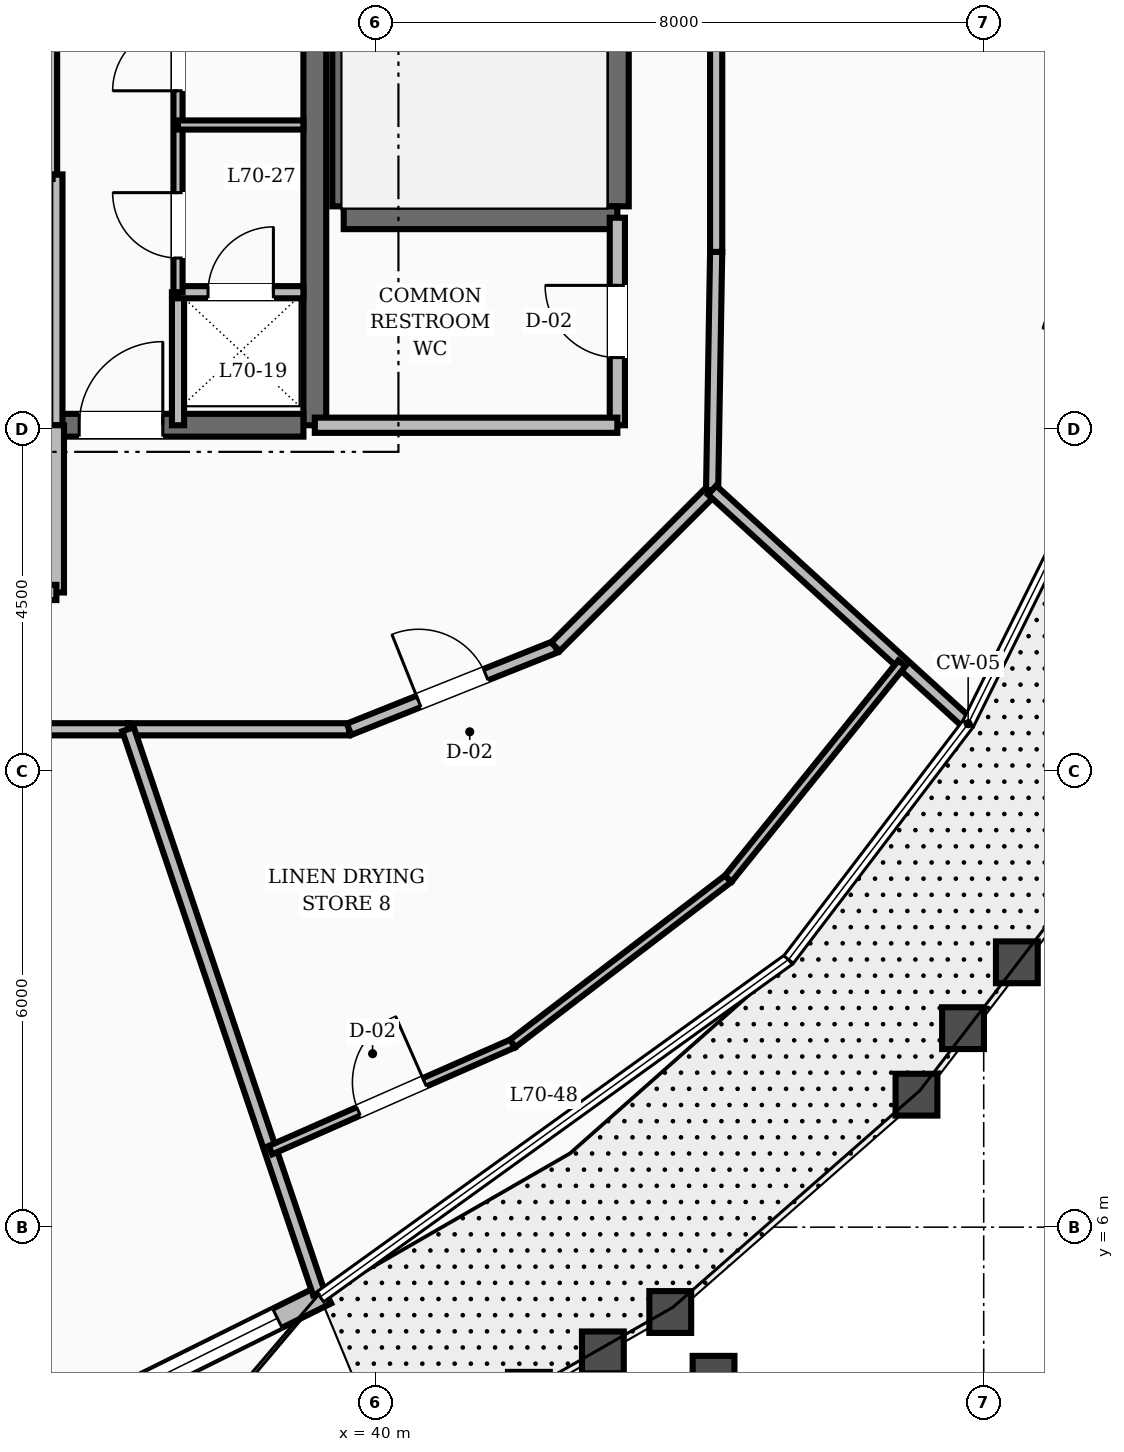
"""IFC4 building model, lengths in metres.
Left out: names, types, materials, properties, quantities, classifications, styles, units other than length and angle.
Written with IfcOpenShell. Run it as: python <this file> out.ifc"""

import sys

from ifc_helpers import new_model, si_unit, direction, frame, frame_2d, origin, place, context, subcontext, project, spatial, rectangle, extrude, element, fill, save


model = new_model("IFC4")
c1 = context("Model", 3, precision=1e-05, world=origin(), true_north=direction((0.0, 1.0)))
c2 = subcontext(c1, "Body", "Model", "MODEL_VIEW")
j1 = project(units=[si_unit("LENGTHUNIT", "METRE"), si_unit("PLANEANGLEUNIT", "RADIAN")], contexts=[c1])
p1 = place(None, origin())
s1 = spatial("IfcSite", under=j1, at=p1, CompositionType="ELEMENT")
p2 = place(p1, origin())
s2 = spatial("IfcBuilding", under=s1, at=p2, CompositionType="ELEMENT")
p3 = place(p2, frame((0.0, 0.0, 268.8)))
s3 = spatial("IfcBuildingStorey", under=s2, at=p3, CompositionType="ELEMENT", Elevation=268.8)
p4 = place(p3, frame((39.2, 16.55, 0.0), z_axis=(0.0, 0.0, 1.0), x_axis=(0.0, 1.0, 0.0)))
e1 = element("IfcWall", 1, at=p4, inside=s3, PredefinedType="SHEAR", context=c2, shape_type="SweptSolid", body=[
    extrude(rectangle(XDim=6.3, YDim=0.3, at=frame_2d((3.15, 0.0))), origin(), (0.0, 0.0, 1.0), 3.6),
])
p5 = place(p3, frame((35.8, 16.55, 0.0), z_axis=(0.0, 0.0, 1.0), x_axis=(1.0, 0.0, 0.0)))
e2 = element("IfcWall", 2, at=p5, inside=s3, PredefinedType="SHEAR", context=c2, shape_type="SweptSolid", body=[
    extrude(rectangle(XDim=3.25, YDim=0.3, at=frame_2d((1.625, 0.0))), origin(), (0.0, 0.0, 1.0), 3.6),
])
p6 = place(p5, frame((0.3, 0.0, 0.0)))
e3 = element("IfcOpeningElement", 3, at=p6, cuts=e2, PredefinedType="OPENING", context=c2, shape_type="SweptSolid", body=[
    extrude(rectangle(XDim=1.1, YDim=2.1, at=frame_2d((0.55, 1.05))), frame((0.0, 0.16, 0.0), z_axis=(0.0, -1.0, 0.0), x_axis=(1.0, 0.0, 0.0)), (0.0, 0.0, 1.0), 0.32),
])
for number, where, z_axis, x_axis in (
    (4, (43.18, 19.43, 0.0), (0.0, 0.0, 1.0), (0.0, 1.0, 0.0)),
    (5, (39.58, 19.43, 0.0), (0.0, 0.0, 1.0), (0.0, 1.0, 0.0)),
):
    element("IfcWall", number, at=place(p3, frame(where, z_axis=z_axis, x_axis=x_axis)), inside=s3, PredefinedType="SHEAR", context=c2, shape_type="SweptSolid", body=[
        extrude(rectangle(XDim=8.74, YDim=0.3, at=frame_2d((4.37, 0.0))), origin(), (0.0, 0.0, 1.0), 3.6),
    ])
p7 = place(p3, frame((39.58, 19.28, 0.0), z_axis=(0.0, 0.0, 1.0), x_axis=(1.0, 0.0, 0.0)))
e6 = element("IfcWall", 6, at=p7, inside=s3, PredefinedType="SHEAR", context=c2, shape_type="SweptSolid", body=[
    extrude(rectangle(XDim=3.6, YDim=0.3, at=frame_2d((1.8, 0.0))), origin(), (0.0, 0.0, 1.0), 3.6),
])
p8 = place(p3, frame((35.815, 3.367, 0.0), z_axis=(0.0, 0.0, 1.0), x_axis=(0.89575867974, 0.444540647939, 0.0)))
e7 = element("IfcWall", 7, at=p8, inside=s3, PredefinedType="STANDARD", context=c2, shape_type="SweptSolid", body=[
    extrude(rectangle(XDim=3.949, YDim=0.28, at=frame_2d((1.974, 0.0))), origin(), (0.0, 0.0, 1.0), 2.88),
])
p9 = place(p8, frame((0.628, 0.0, 0.8)))
e8 = element("IfcOpeningElement", 8, at=p9, cuts=e7, PredefinedType="OPENING", context=c2, shape_type="SweptSolid", body=[
    extrude(rectangle(XDim=2.6, YDim=1.65, at=frame_2d((1.3, 0.825))), frame((0.0, 0.15, 0.0), z_axis=(0.0, -1.0, 0.0), x_axis=(1.0, 0.0, 0.0)), (0.0, 0.0, 1.0), 0.3),
])
p10 = place(p3, frame((43.18, 16.55, 0.0), z_axis=(0.0, 0.0, 1.0), x_axis=(0.0, 1.0, 0.0)))
e9 = element("IfcWall", 9, at=p10, inside=s3, PredefinedType="SOLIDWALL", context=c2, shape_type="SweptSolid", body=[
    extrude(rectangle(XDim=2.73, YDim=0.2, at=frame_2d((1.365, 0.0))), origin(), (0.0, 0.0, 1.0), 2.87),
])
p11 = place(p10, frame((0.89, 0.0, 0.0)))
e10 = element("IfcOpeningElement", 10, at=p11, cuts=e9, PredefinedType="OPENING", context=c2, shape_type="SweptSolid", body=[
    extrude(rectangle(XDim=0.95, YDim=2.1, at=frame_2d((0.475, 1.05))), frame((0.0, 0.11, 0.0), z_axis=(0.0, -1.0, 0.0), x_axis=(1.0, 0.0, 0.0)), (0.0, 0.0, 1.0), 0.22),
])
p12 = place(p3, frame((39.2, 16.55, 0.0), z_axis=(0.0, 0.0, 1.0), x_axis=(1.0, 0.0, 0.0)))
e11 = element("IfcWall", 11, at=p12, inside=s3, PredefinedType="SOLIDWALL", context=c2, shape_type="SweptSolid", body=[
    extrude(rectangle(XDim=3.98, YDim=0.2, at=frame_2d((1.99, 0.0))), origin(), (0.0, 0.0, 1.0), 2.87),
])
p13 = place(p3, frame((35.8, 16.55, 0.0), z_axis=(0.0, 0.0, 1.0), x_axis=(0.0, 1.0, 0.0)))
e12 = element("IfcWall", 12, at=p13, inside=s3, PredefinedType="SOLIDWALL", context=c2, shape_type="SweptSolid", body=[
    extrude(rectangle(XDim=3.3, YDim=0.16, at=frame_2d((1.65, 0.0))), origin(), (0.0, 0.0, 1.0), 2.87),
])
p14 = place(p3, frame((37.4, 16.55, 0.0), z_axis=(0.0, 0.0, 1.0), x_axis=(0.0, 1.0, 0.0)))
e13 = element("IfcWall", 13, at=p14, inside=s3, PredefinedType="SOLIDWALL", context=c2, shape_type="SweptSolid", body=[
    extrude(rectangle(XDim=1.75, YDim=0.16, at=frame_2d((0.875, 0.0))), origin(), (0.0, 0.0, 1.0), 2.87),
])
p15 = place(p3, frame((35.8, 14.35, 0.0), z_axis=(0.0, 0.0, 1.0), x_axis=(0.0, 1.0, 0.0)))
e14 = element("IfcWall", 14, at=p15, inside=s3, PredefinedType="SOLIDWALL", context=c2, shape_type="SweptSolid", body=[
    extrude(rectangle(XDim=2.2, YDim=0.2, at=frame_2d((1.1, 0.0))), origin(), (0.0, 0.0, 1.0), 2.87),
])
p16 = place(p3, frame((28.2, 14.35, 0.0), z_axis=(0.0, 0.0, 1.0), x_axis=(1.0, 0.0, 0.0)))
e15 = element("IfcWall", 15, at=p16, inside=s3, PredefinedType="SOLIDWALL", context=c2, shape_type="SweptSolid", body=[
    extrude(rectangle(XDim=7.6, YDim=0.2, at=frame_2d((3.8, 0.0))), origin(), (0.0, 0.0, 1.0), 2.87),
])
p17 = place(p16, frame((3.2, 0.0, 0.0)))
e16 = element("IfcOpeningElement", 16, at=p17, cuts=e15, PredefinedType="OPENING", context=c2, shape_type="SweptSolid", body=[
    extrude(rectangle(XDim=1.2, YDim=2.1, at=frame_2d((0.6, 1.05))), frame((0.0, 0.11, 0.0), z_axis=(0.0, -1.0, 0.0), x_axis=(1.0, 0.0, 0.0)), (0.0, 0.0, 1.0), 0.22),
])
p18 = place(p3, frame((30.8, 19.85, 0.0), z_axis=(0.0, 0.0, 1.0), x_axis=(1.0, 0.0, 0.0)))
e17 = element("IfcWall", 17, at=p18, inside=s3, PredefinedType="PARTITIONING", context=c2, shape_type="SweptSolid", body=[
    extrude(rectangle(XDim=4.95, YDim=0.12, at=frame_2d((2.475, 0.0))), origin(), (0.0, 0.0, 1.0), 2.87),
])
p19 = place(p3, frame((35.75, 19.85, 0.0), z_axis=(0.0, 0.0, 1.0), x_axis=(0.0, 1.0, 0.0)))
e18 = element("IfcWall", 18, at=p19, inside=s3, PredefinedType="PARTITIONING", context=c2, shape_type="SweptSolid", body=[
    extrude(rectangle(XDim=2.83, YDim=0.12, at=frame_2d((1.415, 0.0))), origin(), (0.0, 0.0, 1.0), 2.87),
])
p20 = place(p3, frame((37.4, 18.3, 0.0), z_axis=(0.0, 0.0, 1.0), x_axis=(1.0, 0.0, 0.0)))
e19 = element("IfcWall", 19, at=p20, inside=s3, PredefinedType="SOLIDWALL", context=c2, shape_type="SweptSolid", body=[
    extrude(rectangle(XDim=1.65, YDim=0.16, at=frame_2d((0.825, 0.0))), origin(), (0.0, 0.0, 1.0), 2.87),
])
p21 = place(p20, frame((0.395, 0.0, 0.0)))
e20 = element("IfcOpeningElement", 20, at=p21, cuts=e19, PredefinedType="OPENING", context=c2, shape_type="SweptSolid", body=[
    extrude(rectangle(XDim=0.86, YDim=2.1, at=frame_2d((0.43, 1.05))), frame((0.0, 0.09, 0.0), z_axis=(0.0, -1.0, 0.0), x_axis=(1.0, 0.0, 0.0)), (0.0, 0.0, 1.0), 0.18),
])
p22 = place(p3, frame((37.4, 18.3, 0.0), z_axis=(0.0, 0.0, 1.0), x_axis=(0.0, 1.0, 0.0)))
e21 = element("IfcWall", 21, at=p22, inside=s3, PredefinedType="PARTITIONING", context=c2, shape_type="SweptSolid", body=[
    extrude(rectangle(XDim=4.45, YDim=0.12, at=frame_2d((2.225, 0.0))), origin(), (0.0, 0.0, 1.0), 2.87),
])
p23 = place(p22, frame((0.45, 0.0, 0.0)))
e22 = element("IfcOpeningElement", 22, at=p23, cuts=e21, PredefinedType="OPENING", context=c2, shape_type="SweptSolid", body=[
    extrude(rectangle(XDim=0.86, YDim=2.1, at=frame_2d((0.43, 1.05))), frame((0.0, 0.07, 0.0), z_axis=(0.0, -1.0, 0.0), x_axis=(1.0, 0.0, 0.0)), (0.0, 0.0, 1.0), 0.14),
])
p24 = place(p22, frame((2.65, 0.0, 0.0)))
e23 = element("IfcOpeningElement", 23, at=p24, cuts=e21, PredefinedType="OPENING", context=c2, shape_type="SweptSolid", body=[
    extrude(rectangle(XDim=0.86, YDim=2.1, at=frame_2d((0.43, 1.05))), frame((0.0, 0.07, 0.0), z_axis=(0.0, -1.0, 0.0), x_axis=(1.0, 0.0, 0.0)), (0.0, 0.0, 1.0), 0.14),
])
p25 = place(p3, frame((37.4, 20.5, 0.0), z_axis=(0.0, 0.0, 1.0), x_axis=(1.0, 0.0, 0.0)))
e24 = element("IfcWall", 24, at=p25, inside=s3, PredefinedType="PARTITIONING", context=c2, shape_type="SweptSolid", body=[
    extrude(rectangle(XDim=1.65, YDim=0.12, at=frame_2d((0.825, 0.0))), origin(), (0.0, 0.0, 1.0), 2.87),
])
p26 = place(p3, frame((34.278, 12.55, 0.0), z_axis=(0.0, 0.0, 1.0), x_axis=(1.0, 0.0, 0.0)))
e25 = element("IfcWall", 25, at=p26, inside=s3, PredefinedType="SOLIDWALL", context=c2, shape_type="SweptSolid", body=[
    extrude(rectangle(XDim=2.465, YDim=0.16, at=frame_2d((1.232, 0.0))), origin(), (0.0, 0.0, 1.0), 2.87),
])
p27 = place(p3, frame((36.743, 12.55, 0.0), z_axis=(0.0, 0.0, 1.0), x_axis=(1.0, 0.0, 0.0)))
e26 = element("IfcWall", 26, at=p27, inside=s3, PredefinedType="SOLIDWALL", context=c2, shape_type="SweptSolid", body=[
    extrude(rectangle(XDim=2.908, YDim=0.16, at=frame_2d((1.454, 0.0))), origin(), (0.0, 0.0, 1.0), 2.87),
])
p28 = place(p3, frame((39.651, 12.55, 0.0), z_axis=(0.0, 0.0, 1.0), x_axis=(0.92856882165, 0.371160266542, 0.0)))
e27 = element("IfcWall", 27, at=p28, inside=s3, PredefinedType="SOLIDWALL", context=c2, shape_type="SweptSolid", body=[
    extrude(rectangle(XDim=2.923, YDim=0.16, at=frame_2d((1.461, 0.0))), origin(), (0.0, 0.0, 1.0), 2.87),
])
p29 = place(p28, frame((0.987, 0.0, 0.0)))
e28 = element("IfcOpeningElement", 28, at=p29, cuts=e27, PredefinedType="OPENING", context=c2, shape_type="SweptSolid", body=[
    extrude(rectangle(XDim=0.95, YDim=2.1, at=frame_2d((0.475, 1.05))), frame((0.0, 0.09, 0.0), z_axis=(0.0, -1.0, 0.0), x_axis=(1.0, 0.0, 0.0)), (0.0, 0.0, 1.0), 0.18),
])
p30 = place(p3, frame((42.365, 13.635, 0.0), z_axis=(0.0, 0.0, 1.0), x_axis=(0.707106781187, 0.707106781187, 0.0)))
e29 = element("IfcWall", 29, at=p30, inside=s3, PredefinedType="SOLIDWALL", context=c2, shape_type="SweptSolid", body=[
    extrude(rectangle(XDim=2.916, YDim=0.16, at=frame_2d((1.458, 0.0))), origin(), (0.0, 0.0, 1.0), 2.87),
])
p31 = place(p3, frame((44.427, 15.697, 0.0), z_axis=(0.0, 0.0, 1.0), x_axis=(0.016981035134, 0.999855811828, 0.0)))
e30 = element("IfcWall", 30, at=p31, inside=s3, PredefinedType="SOLIDWALL", context=c2, shape_type="SweptSolid", body=[
    extrude(rectangle(XDim=3.134, YDim=0.16, at=frame_2d((1.567, 0.0))), origin(), (0.0, 0.0, 1.0), 2.87),
])
p32 = place(p3, frame((44.48, 18.831, 0.0), z_axis=(0.0, 0.0, 1.0), x_axis=(0.0, 1.0, 0.0)))
e31 = element("IfcWall", 31, at=p32, inside=s3, PredefinedType="SOLIDWALL", context=c2, shape_type="SweptSolid", body=[
    extrude(rectangle(XDim=2.687, YDim=0.16, at=frame_2d((1.344, 0.0))), origin(), (0.0, 0.0, 1.0), 2.87),
])
p33 = place(p3, frame((44.427, 15.697, 0.0), z_axis=(0.0, 0.0, 1.0), x_axis=(0.73873859701, -0.673992051354, 0.0)))
e32 = element("IfcWall", 32, at=p33, inside=s3, PredefinedType="SOLIDWALL", context=c2, shape_type="SweptSolid", body=[
    extrude(rectangle(XDim=4.51, YDim=0.16, at=frame_2d((2.255, 0.0))), origin(), (0.0, 0.0, 1.0), 2.87),
])
p34 = place(p3, frame((36.743, 12.55, 0.0), z_axis=(0.0, 0.0, 1.0), x_axis=(0.320543694865, -0.947233730228, 0.0)))
e33 = element("IfcWall", 33, at=p34, inside=s3, PredefinedType="SOLIDWALL", context=c2, shape_type="SweptSolid", body=[
    extrude(rectangle(XDim=7.834, YDim=0.16, at=frame_2d((3.917, 0.0))), origin(), (0.0, 0.0, 1.0), 2.87),
])
p35 = place(p3, frame((38.616, 7.013, 0.0), z_axis=(0.0, 0.0, 1.0), x_axis=(0.915245747152, 0.402896044061, 0.0)))
e34 = element("IfcWall", 34, at=p35, inside=s3, PredefinedType="PARTITIONING", context=c2, shape_type="SweptSolid", body=[
    extrude(rectangle(XDim=3.482, YDim=0.12, at=frame_2d((1.741, 0.0))), origin(), (0.0, 0.0, 1.0), 2.87),
])
p36 = place(p35, frame((1.266, 0.0, 0.0)))
e35 = element("IfcOpeningElement", 35, at=p36, cuts=e34, PredefinedType="OPENING", context=c2, shape_type="SweptSolid", body=[
    extrude(rectangle(XDim=0.95, YDim=2.1, at=frame_2d((0.475, 1.05))), frame((0.0, 0.07, 0.0), z_axis=(0.0, -1.0, 0.0), x_axis=(1.0, 0.0, 0.0)), (0.0, 0.0, 1.0), 0.14),
])
p37 = place(p3, frame((41.803, 8.416, 0.0), z_axis=(0.0, 0.0, 1.0), x_axis=(0.794435462841, 0.60734857815, 0.0)))
e36 = element("IfcWall", 36, at=p37, inside=s3, PredefinedType="PARTITIONING", context=c2, shape_type="SweptSolid", body=[
    extrude(rectangle(XDim=3.57, YDim=0.12, at=frame_2d((1.785, 0.0))), origin(), (0.0, 0.0, 1.0), 2.87),
])
p38 = place(p3, frame((44.639, 10.585, 0.0), z_axis=(0.0, 0.0, 1.0), x_axis=(0.627651500922, 0.77849444018, 0.0)))
e37 = element("IfcWall", 37, at=p38, inside=s3, PredefinedType="PARTITIONING", context=c2, shape_type="SweptSolid", body=[
    extrude(rectangle(XDim=3.64, YDim=0.12, at=frame_2d((1.82, 0.0))), origin(), (0.0, 0.0, 1.0), 2.87),
])
p39 = place(p9, origin())
e38 = element("IfcWindow", 38, at=p39, inside=s3, PartitioningType="SINGLE_PANEL", PredefinedType="WINDOW", context=c2, shape_type="SweptSolid", body=[
    extrude(rectangle(XDim=2.6, YDim=1.65, at=frame_2d((1.3, 0.825))), frame((0.0, 0.03, 0.0), z_axis=(0.0, -1.0, 0.0), x_axis=(1.0, 0.0, 0.0)), (0.0, 0.0, 1.0), 0.06),
])
fill(e8, e38)
p40 = place(p11, origin())
e39 = element("IfcDoor", 39, at=p40, inside=s3, OperationType="SINGLE_SWING_RIGHT", PredefinedType="DOOR", context=c2, shape_type="SweptSolid", body=[
    extrude(rectangle(XDim=0.95, YDim=2.1, at=frame_2d((0.475, 1.05))), frame((0.0, 0.025, 0.0), z_axis=(0.0, -1.0, 0.0), x_axis=(1.0, 0.0, 0.0)), (0.0, 0.0, 1.0), 0.05),
])
fill(e10, e39)
p41 = place(p6, origin())
e40 = element("IfcDoor", 40, at=p41, inside=s3, OperationType="SINGLE_SWING_RIGHT", PredefinedType="DOOR", context=c2, shape_type="SweptSolid", body=[
    extrude(rectangle(XDim=1.1, YDim=2.1, at=frame_2d((0.55, 1.05))), frame((0.0, 0.025, 0.0), z_axis=(0.0, -1.0, 0.0), x_axis=(1.0, 0.0, 0.0)), (0.0, 0.0, 1.0), 0.05),
])
fill(e3, e40)
p42 = place(p21, origin())
e41 = element("IfcDoor", 41, at=p42, inside=s3, OperationType="SINGLE_SWING_RIGHT", PredefinedType="TRAPDOOR", context=c2, shape_type="SweptSolid", body=[
    extrude(rectangle(XDim=0.86, YDim=2.1, at=frame_2d((0.43, 1.05))), frame((0.0, 0.025, 0.0), z_axis=(0.0, -1.0, 0.0), x_axis=(1.0, 0.0, 0.0)), (0.0, 0.0, 1.0), 0.05),
])
fill(e20, e41)
p43 = place(p23, origin())
e42 = element("IfcDoor", 42, at=p43, inside=s3, OperationType="SINGLE_SWING_RIGHT", PredefinedType="DOOR", context=c2, shape_type="SweptSolid", body=[
    extrude(rectangle(XDim=0.86, YDim=2.1, at=frame_2d((0.43, 1.05))), frame((0.0, 0.025, 0.0), z_axis=(0.0, -1.0, 0.0), x_axis=(1.0, 0.0, 0.0)), (0.0, 0.0, 1.0), 0.05),
])
fill(e22, e42)
p44 = place(p24, origin())
e43 = element("IfcDoor", 43, at=p44, inside=s3, OperationType="SINGLE_SWING_LEFT", PredefinedType="DOOR", context=c2, shape_type="SweptSolid", body=[
    extrude(rectangle(XDim=0.86, YDim=2.1, at=frame_2d((0.43, 1.05))), frame((0.0, 0.025, 0.0), z_axis=(0.0, -1.0, 0.0), x_axis=(1.0, 0.0, 0.0)), (0.0, 0.0, 1.0), 0.05),
])
fill(e23, e43)
p45 = place(p29, origin())
e44 = element("IfcDoor", 44, at=p45, inside=s3, OperationType="SINGLE_SWING_LEFT", PredefinedType="DOOR", context=c2, shape_type="SweptSolid", body=[
    extrude(rectangle(XDim=0.95, YDim=2.1, at=frame_2d((0.475, 1.05))), frame((0.0, 0.025, 0.0), z_axis=(0.0, -1.0, 0.0), x_axis=(1.0, 0.0, 0.0)), (0.0, 0.0, 1.0), 0.05),
])
fill(e28, e44)
p46 = place(p36, origin())
e45 = element("IfcDoor", 45, at=p46, inside=s3, OperationType="SINGLE_SWING_RIGHT", PredefinedType="DOOR", context=c2, shape_type="SweptSolid", body=[
    extrude(rectangle(XDim=0.95, YDim=2.1, at=frame_2d((0.475, 1.05))), frame((0.0, 0.025, 0.0), z_axis=(0.0, -1.0, 0.0), x_axis=(1.0, 0.0, 0.0)), (0.0, 0.0, 1.0), 0.05),
])
fill(e35, e45)
save(model, sys.argv[1])
